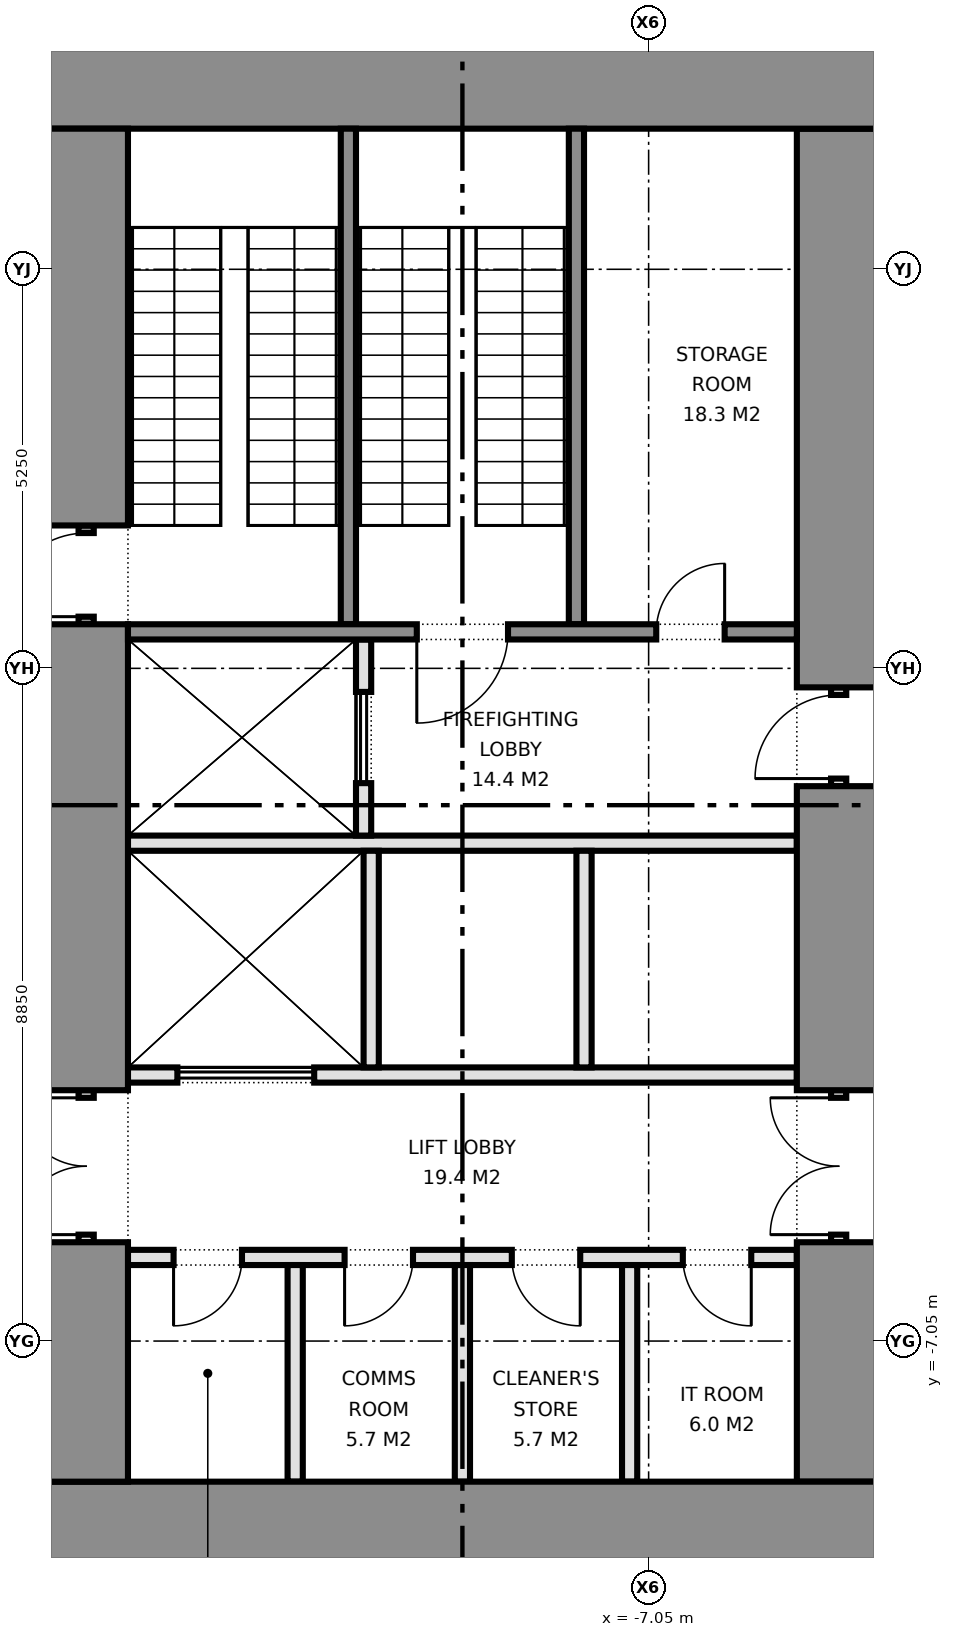
"""IFC4 building model, lengths in metres.
Left out: names, types, materials, properties, quantities, classifications, styles, units other than length and angle.
Written with IfcOpenShell. Run it as: python <this file> out.ifc"""

import sys

from ifc_helpers import new_model, si_unit, direction, frame, frame_2d, origin, place, context, subcontext, project, spatial, rectangle, extrude, element, fill, save


model = new_model("IFC4")
c1 = context("Model", 3, precision=1e-05, world=origin(), true_north=direction((0.0, 1.0)))
c2 = subcontext(c1, "Body", "Model", "MODEL_VIEW")
j1 = project(units=[si_unit("LENGTHUNIT", "METRE"), si_unit("PLANEANGLEUNIT", "RADIAN")], contexts=[c1])
p1 = place(None, origin())
s1 = spatial("IfcSite", under=j1, at=p1, CompositionType="ELEMENT")
p2 = place(p1, origin())
s2 = spatial("IfcBuilding", under=s1, at=p2, CompositionType="ELEMENT")
p3 = place(p2, frame((0.0, 0.0, -10.0)))
s3 = spatial("IfcBuildingStorey", under=s2, at=p3, CompositionType="ELEMENT", Elevation=-10.0)
for number, where, z_axis, x_axis in (
    (1, (-15.0, -9.45, 0.0), (0.0, 0.0, 1.0), (1.0, 0.0, 0.0)),
    (2, (-15.0, 9.45, 0.0), (0.0, 0.0, 1.0), (1.0, 0.0, 0.0)),
):
    element("IfcWall", number, at=place(p3, frame(where, z_axis=z_axis, x_axis=x_axis)), inside=s3, PredefinedType="SHEAR", context=c2, shape_type="SweptSolid", body=[
        extrude(rectangle(XDim=11.0, YDim=1.1, at=frame_2d((5.5, 0.0))), origin(), (0.0, 0.0, 1.0), 4.7),
    ])
p4 = place(p3, frame((-14.45, -8.9, 0.0), z_axis=(0.0, 0.0, 1.0), x_axis=(0.0, 1.0, 0.0)))
e3 = element("IfcWall", 3, at=p4, inside=s3, PredefinedType="SHEAR", context=c2, shape_type="SweptSolid", body=[
    extrude(rectangle(XDim=3.15, YDim=1.1, at=frame_2d((1.575, 0.0))), origin(), (0.0, 0.0, 1.0), 4.7),
])
p5 = place(p3, frame((-14.45, -5.75, 0.0), z_axis=(0.0, 0.0, 1.0), x_axis=(0.0, 1.0, 0.0)))
e4 = element("IfcWall", 4, at=p5, inside=s3, PredefinedType="PARTITIONING", context=c2, shape_type="SweptSolid", body=[
    extrude(rectangle(XDim=2.0, YDim=0.2, at=frame_2d((1.0, 0.0))), origin(), (0.0, 0.0, 1.0), 2.4),
])
p6 = place(p5, frame((0.1, 0.0, 0.0)))
e5 = element("IfcOpeningElement", 5, at=p6, cuts=e4, PredefinedType="OPENING", context=c2, shape_type="SweptSolid", body=[
    extrude(rectangle(XDim=1.8, YDim=2.1, at=frame_2d((0.9, 1.05))), frame((0.0, 0.11, 0.0), z_axis=(0.0, -1.0, 0.0), x_axis=(1.0, 0.0, 0.0)), (0.0, 0.0, 1.0), 0.22),
])
p7 = place(p3, frame((-14.45, -3.75, 0.0), z_axis=(0.0, 0.0, 1.0), x_axis=(0.0, 1.0, 0.0)))
e6 = element("IfcWall", 6, at=p7, inside=s3, PredefinedType="SHEAR", context=c2, shape_type="SweptSolid", body=[
    extrude(rectangle(XDim=6.13, YDim=1.1, at=frame_2d((3.065, 0.0))), origin(), (0.0, 0.0, 1.0), 4.7),
])
p8 = place(p3, frame((-14.45, 2.38, 0.0), z_axis=(0.0, 0.0, 1.0), x_axis=(0.0, 1.0, 0.0)))
e7 = element("IfcWall", 7, at=p8, inside=s3, PredefinedType="SHEAR", context=c2, shape_type="SweptSolid", body=[
    extrude(rectangle(XDim=1.3, YDim=0.2, at=frame_2d((0.65, 0.0))), origin(), (0.0, 0.0, 1.0), 2.4),
])
p9 = place(p8, frame((0.1, 0.0, 0.0)))
e8 = element("IfcOpeningElement", 8, at=p9, cuts=e7, PredefinedType="OPENING", context=c2, shape_type="SweptSolid", body=[
    extrude(rectangle(XDim=1.1, YDim=2.1, at=frame_2d((0.55, 1.05))), frame((0.0, 0.11, 0.0), z_axis=(0.0, -1.0, 0.0), x_axis=(1.0, 0.0, 0.0)), (0.0, 0.0, 1.0), 0.22),
])
p10 = place(p3, frame((-14.45, 3.68, 0.0), z_axis=(0.0, 0.0, 1.0), x_axis=(0.0, 1.0, 0.0)))
e9 = element("IfcWall", 9, at=p10, inside=s3, PredefinedType="SHEAR", context=c2, shape_type="SweptSolid", body=[
    extrude(rectangle(XDim=5.22, YDim=1.1, at=frame_2d((2.61, 0.0))), origin(), (0.0, 0.0, 1.0), 4.7),
])
p11 = place(p3, frame((-4.55, -8.9, 0.0), z_axis=(0.0, 0.0, 1.0), x_axis=(0.0, 1.0, 0.0)))
e10 = element("IfcWall", 10, at=p11, inside=s3, PredefinedType="SHEAR", context=c2, shape_type="SweptSolid", body=[
    extrude(rectangle(XDim=3.15, YDim=1.1, at=frame_2d((1.575, 0.0))), origin(), (0.0, 0.0, 1.0), 4.7),
])
p12 = place(p3, frame((-4.55, -5.75, 0.0), z_axis=(0.0, 0.0, 1.0), x_axis=(0.0, 1.0, 0.0)))
e11 = element("IfcWall", 11, at=p12, inside=s3, PredefinedType="PARTITIONING", context=c2, shape_type="SweptSolid", body=[
    extrude(rectangle(XDim=2.0, YDim=0.2, at=frame_2d((1.0, 0.0))), origin(), (0.0, 0.0, 1.0), 2.4),
])
p13 = place(p12, frame((0.1, 0.0, 0.0)))
e12 = element("IfcOpeningElement", 12, at=p13, cuts=e11, PredefinedType="OPENING", context=c2, shape_type="SweptSolid", body=[
    extrude(rectangle(XDim=1.8, YDim=2.1, at=frame_2d((0.9, 1.05))), frame((0.0, 0.11, 0.0), z_axis=(0.0, -1.0, 0.0), x_axis=(1.0, 0.0, 0.0)), (0.0, 0.0, 1.0), 0.22),
])
p14 = place(p3, frame((-4.55, -3.75, 0.0), z_axis=(0.0, 0.0, 1.0), x_axis=(0.0, 1.0, 0.0)))
e13 = element("IfcWall", 13, at=p14, inside=s3, PredefinedType="SHEAR", context=c2, shape_type="SweptSolid", body=[
    extrude(rectangle(XDim=4.0, YDim=1.1, at=frame_2d((2.0, 0.0))), origin(), (0.0, 0.0, 1.0), 4.7),
])
p15 = place(p3, frame((-4.55, 0.25, 0.0), z_axis=(0.0, 0.0, 1.0), x_axis=(0.0, 1.0, 0.0)))
e14 = element("IfcWall", 14, at=p15, inside=s3, PredefinedType="PARTITIONING", context=c2, shape_type="SweptSolid", body=[
    extrude(rectangle(XDim=1.3, YDim=0.2, at=frame_2d((0.65, 0.0))), origin(), (0.0, 0.0, 1.0), 2.4),
])
p16 = place(p15, frame((0.1, 0.0, 0.0)))
e15 = element("IfcOpeningElement", 15, at=p16, cuts=e14, PredefinedType="OPENING", context=c2, shape_type="SweptSolid", body=[
    extrude(rectangle(XDim=1.1, YDim=2.1, at=frame_2d((0.55, 1.05))), frame((0.0, 0.11, 0.0), z_axis=(0.0, -1.0, 0.0), x_axis=(1.0, 0.0, 0.0)), (0.0, 0.0, 1.0), 0.22),
])
p17 = place(p3, frame((-4.55, 1.55, 0.0), z_axis=(0.0, 0.0, 1.0), x_axis=(0.0, 1.0, 0.0)))
e16 = element("IfcWall", 16, at=p17, inside=s3, PredefinedType="SHEAR", context=c2, shape_type="SweptSolid", body=[
    extrude(rectangle(XDim=7.35, YDim=1.1, at=frame_2d((3.675, 0.0))), origin(), (0.0, 0.0, 1.0), 4.7),
])
p18 = place(p3, frame((-13.9, -5.95, 0.0), z_axis=(0.0, 0.0, 1.0), x_axis=(1.0, 0.0, 0.0)))
e17 = element("IfcWall", 17, at=p18, inside=s3, PredefinedType="PARTITIONING", context=c2, shape_type="SweptSolid", body=[
    extrude(rectangle(XDim=8.8, YDim=0.2, at=frame_2d((4.4, 0.0))), origin(), (0.0, 0.0, 1.0), 4.7),
])
p19 = place(p18, frame((0.6, 0.0, 0.0)))
e18 = element("IfcOpeningElement", 18, at=p19, cuts=e17, PredefinedType="OPENING", context=c2, shape_type="SweptSolid", body=[
    extrude(rectangle(XDim=0.9, YDim=2.1, at=frame_2d((0.45, 1.05))), frame((0.0, 0.11, 0.0), z_axis=(0.0, -1.0, 0.0), x_axis=(1.0, 0.0, 0.0)), (0.0, 0.0, 1.0), 0.22),
])
p20 = place(p18, frame((2.85, 0.0, 0.0)))
e19 = element("IfcOpeningElement", 19, at=p20, cuts=e17, PredefinedType="OPENING", context=c2, shape_type="SweptSolid", body=[
    extrude(rectangle(XDim=0.9, YDim=2.1, at=frame_2d((0.45, 1.05))), frame((0.0, 0.11, 0.0), z_axis=(0.0, -1.0, 0.0), x_axis=(1.0, 0.0, 0.0)), (0.0, 0.0, 1.0), 0.22),
])
p21 = place(p18, frame((5.05, 0.0, 0.0)))
e20 = element("IfcOpeningElement", 20, at=p21, cuts=e17, PredefinedType="OPENING", context=c2, shape_type="SweptSolid", body=[
    extrude(rectangle(XDim=0.9, YDim=2.1, at=frame_2d((0.45, 1.05))), frame((0.0, 0.11, 0.0), z_axis=(0.0, -1.0, 0.0), x_axis=(1.0, 0.0, 0.0)), (0.0, 0.0, 1.0), 0.22),
])
p22 = place(p18, frame((7.3, 0.0, 0.0)))
e21 = element("IfcOpeningElement", 21, at=p22, cuts=e17, PredefinedType="OPENING", context=c2, shape_type="SweptSolid", body=[
    extrude(rectangle(XDim=0.9, YDim=2.1, at=frame_2d((0.45, 1.05))), frame((0.0, 0.11, 0.0), z_axis=(0.0, -1.0, 0.0), x_axis=(1.0, 0.0, 0.0)), (0.0, 0.0, 1.0), 0.22),
])
p23 = place(p3, frame((-13.9, -3.55, 0.0), z_axis=(0.0, 0.0, 1.0), x_axis=(1.0, 0.0, 0.0)))
e22 = element("IfcWall", 22, at=p23, inside=s3, PredefinedType="PARTITIONING", context=c2, shape_type="SweptSolid", body=[
    extrude(rectangle(XDim=8.8, YDim=0.2, at=frame_2d((4.4, 0.0))), origin(), (0.0, 0.0, 1.0), 4.7),
])
p24 = place(p23, frame((0.65, 0.0, 0.0)))
e23 = element("IfcOpeningElement", 23, at=p24, cuts=e22, PredefinedType="OPENING", context=c2, shape_type="SweptSolid", body=[
    extrude(rectangle(XDim=1.8, YDim=2.1, at=frame_2d((0.9, 1.05))), frame((0.0, 0.11, 0.0), z_axis=(0.0, -1.0, 0.0), x_axis=(1.0, 0.0, 0.0)), (0.0, 0.0, 1.0), 0.22),
])
p25 = place(p3, frame((-13.9, -0.5, 0.0), z_axis=(0.0, 0.0, 1.0), x_axis=(1.0, 0.0, 0.0)))
e24 = element("IfcWall", 24, at=p25, inside=s3, PredefinedType="PARTITIONING", context=c2, shape_type="SweptSolid", body=[
    extrude(rectangle(XDim=8.8, YDim=0.2, at=frame_2d((4.4, 0.0))), origin(), (0.0, 0.0, 1.0), 4.7),
])
p26 = place(p3, frame((-10.8, -0.4, 0.0), z_axis=(0.0, 0.0, 1.0), x_axis=(0.0, 1.0, 0.0)))
e25 = element("IfcWall", 25, at=p26, inside=s3, PredefinedType="PARTITIONING", context=c2, shape_type="SweptSolid", body=[
    extrude(rectangle(XDim=2.58, YDim=0.2, at=frame_2d((1.29, 0.0))), origin(), (0.0, 0.0, 1.0), 4.7),
])
p27 = place(p26, frame((0.69, 0.0, 0.0)))
e26 = element("IfcOpeningElement", 26, at=p27, cuts=e25, PredefinedType="OPENING", context=c2, shape_type="SweptSolid", body=[
    extrude(rectangle(XDim=1.2, YDim=2.1, at=frame_2d((0.6, 1.05))), frame((0.0, 0.11, 0.0), z_axis=(0.0, -1.0, 0.0), x_axis=(1.0, 0.0, 0.0)), (0.0, 0.0, 1.0), 0.22),
])
p28 = place(p3, frame((-13.9, 2.28, 0.0), z_axis=(0.0, 0.0, 1.0), x_axis=(1.0, 0.0, 0.0)))
e27 = element("IfcWall", 27, at=p28, inside=s3, PredefinedType="SHEAR", context=c2, shape_type="SweptSolid", body=[
    extrude(rectangle(XDim=8.8, YDim=0.2, at=frame_2d((4.4, 0.0))), origin(), (0.0, 0.0, 1.0), 4.7),
])
p29 = place(p28, frame((3.8, 0.0, 0.0)))
e28 = element("IfcOpeningElement", 28, at=p29, cuts=e27, PredefinedType="OPENING", context=c2, shape_type="SweptSolid", body=[
    extrude(rectangle(XDim=1.2, YDim=2.1, at=frame_2d((0.6, 1.05))), frame((0.0, 0.11, 0.0), z_axis=(0.0, -1.0, 0.0), x_axis=(1.0, 0.0, 0.0)), (0.0, 0.0, 1.0), 0.22),
])
p30 = place(p28, frame((6.95, 0.0, 0.0)))
e29 = element("IfcOpeningElement", 29, at=p30, cuts=e27, PredefinedType="OPENING", context=c2, shape_type="SweptSolid", body=[
    extrude(rectangle(XDim=0.9, YDim=2.1, at=frame_2d((0.45, 1.05))), frame((0.0, 0.11, 0.0), z_axis=(0.0, -1.0, 0.0), x_axis=(1.0, 0.0, 0.0)), (0.0, 0.0, 1.0), 0.22),
])
for number, where, z_axis, x_axis in (
    (30, (-11.0, 2.38, 0.0), (0.0, 0.0, 1.0), (0.0, 1.0, 0.0)),
    (31, (-8.0, 2.38, 0.0), (0.0, 0.0, 1.0), (0.0, 1.0, 0.0)),
):
    element("IfcWall", number, at=place(p3, frame(where, z_axis=z_axis, x_axis=x_axis)), inside=s3, PredefinedType="SHEAR", context=c2, shape_type="SweptSolid", body=[
        extrude(rectangle(XDim=6.52, YDim=0.2, at=frame_2d((3.26, 0.0))), origin(), (0.0, 0.0, 1.0), 4.7),
    ])
for number, where, z_axis, x_axis in (
    (32, (-11.7, -8.9, 0.0), (0.0, 0.0, 1.0), (0.0, 1.0, 0.0)),
    (33, (-9.5, -8.9, 0.0), (0.0, 0.0, 1.0), (0.0, 1.0, 0.0)),
    (34, (-7.3, -8.9, 0.0), (0.0, 0.0, 1.0), (0.0, 1.0, 0.0)),
    (35, (-10.7, -3.45, 0.0), (0.0, 0.0, 1.0), (0.0, 1.0, 0.0)),
    (36, (-7.9, -3.45, 0.0), (0.0, 0.0, 1.0), (0.0, 1.0, 0.0)),
):
    element("IfcWall", number, at=place(p3, frame(where, z_axis=z_axis, x_axis=x_axis)), inside=s3, PredefinedType="PARTITIONING", context=c2, shape_type="SweptSolid", body=[
        extrude(rectangle(XDim=2.85, YDim=0.2, at=frame_2d((1.425, 0.0))), origin(), (0.0, 0.0, 1.0), 4.7),
    ])
p31 = place(p6, origin())
e37 = element("IfcDoor", 37, at=p31, inside=s3, OperationType="DOUBLE_DOOR_SINGLE_SWING", PredefinedType="DOOR", context=c2, shape_type="SweptSolid", body=[
    extrude(rectangle(XDim=1.8, YDim=2.1, at=frame_2d((0.9, 1.05))), frame((0.0, 0.025, 0.0), z_axis=(0.0, -1.0, 0.0), x_axis=(1.0, 0.0, 0.0)), (0.0, 0.0, 1.0), 0.05),
])
fill(e5, e37)
p32 = place(p9, origin())
e38 = element("IfcDoor", 38, at=p32, inside=s3, OperationType="SINGLE_SWING_LEFT", PredefinedType="DOOR", context=c2, shape_type="SweptSolid", body=[
    extrude(rectangle(XDim=1.1, YDim=2.1, at=frame_2d((0.55, 1.05))), frame((0.0, 0.025, 0.0), z_axis=(0.0, -1.0, 0.0), x_axis=(1.0, 0.0, 0.0)), (0.0, 0.0, 1.0), 0.05),
])
fill(e8, e38)
p33 = place(p13, origin())
e39 = element("IfcDoor", 39, at=p33, inside=s3, OperationType="DOUBLE_DOOR_SINGLE_SWING", PredefinedType="DOOR", context=c2, shape_type="SweptSolid", body=[
    extrude(rectangle(XDim=1.8, YDim=2.1, at=frame_2d((0.9, 1.05))), frame((0.0, 0.025, 0.0), z_axis=(0.0, -1.0, 0.0), x_axis=(1.0, 0.0, 0.0)), (0.0, 0.0, 1.0), 0.05),
])
fill(e12, e39)
p34 = place(p16, origin())
e40 = element("IfcDoor", 40, at=p34, inside=s3, OperationType="SINGLE_SWING_LEFT", PredefinedType="DOOR", context=c2, shape_type="SweptSolid", body=[
    extrude(rectangle(XDim=1.1, YDim=2.1, at=frame_2d((0.55, 1.05))), frame((0.0, 0.025, 0.0), z_axis=(0.0, -1.0, 0.0), x_axis=(1.0, 0.0, 0.0)), (0.0, 0.0, 1.0), 0.05),
])
fill(e15, e40)
p35 = place(p24, origin())
e41 = element("IfcDoor", 41, at=p35, inside=s3, OperationType="DOUBLE_DOOR_SLIDING", PredefinedType="DOOR", context=c2, shape_type="SweptSolid", body=[
    extrude(rectangle(XDim=1.8, YDim=2.1, at=frame_2d((0.9, 1.05))), frame((0.0, 0.025, 0.0), z_axis=(0.0, -1.0, 0.0), x_axis=(1.0, 0.0, 0.0)), (0.0, 0.0, 1.0), 0.05),
])
fill(e23, e41)
p36 = place(p27, origin())
e42 = element("IfcDoor", 42, at=p36, inside=s3, OperationType="DOUBLE_DOOR_SLIDING", PredefinedType="DOOR", context=c2, shape_type="SweptSolid", body=[
    extrude(rectangle(XDim=1.2, YDim=2.1, at=frame_2d((0.6, 1.05))), frame((0.0, 0.025, 0.0), z_axis=(0.0, -1.0, 0.0), x_axis=(1.0, 0.0, 0.0)), (0.0, 0.0, 1.0), 0.05),
])
fill(e26, e42)
p37 = place(p19, frame((0.9, 0.0, 0.0), z_axis=(0.0, 0.0, 1.0), x_axis=(-1.0, 0.0, 0.0)))
e43 = element("IfcDoor", 43, at=p37, inside=s3, OperationType="SINGLE_SWING_RIGHT", PredefinedType="DOOR", context=c2, shape_type="SweptSolid", body=[
    extrude(rectangle(XDim=0.9, YDim=2.1, at=frame_2d((0.45, 1.05))), frame((0.0, 0.025, 0.0), z_axis=(0.0, -1.0, 0.0), x_axis=(1.0, 0.0, 0.0)), (0.0, 0.0, 1.0), 0.05),
])
fill(e18, e43)
p38 = place(p20, frame((0.9, 0.0, 0.0), z_axis=(0.0, 0.0, 1.0), x_axis=(-1.0, 0.0, 0.0)))
e44 = element("IfcDoor", 44, at=p38, inside=s3, OperationType="SINGLE_SWING_RIGHT", PredefinedType="DOOR", context=c2, shape_type="SweptSolid", body=[
    extrude(rectangle(XDim=0.9, YDim=2.1, at=frame_2d((0.45, 1.05))), frame((0.0, 0.025, 0.0), z_axis=(0.0, -1.0, 0.0), x_axis=(1.0, 0.0, 0.0)), (0.0, 0.0, 1.0), 0.05),
])
fill(e19, e44)
p39 = place(p21, frame((0.9, 0.0, 0.0), z_axis=(0.0, 0.0, 1.0), x_axis=(-1.0, 0.0, 0.0)))
e45 = element("IfcDoor", 45, at=p39, inside=s3, OperationType="SINGLE_SWING_LEFT", PredefinedType="DOOR", context=c2, shape_type="SweptSolid", body=[
    extrude(rectangle(XDim=0.9, YDim=2.1, at=frame_2d((0.45, 1.05))), frame((0.0, 0.025, 0.0), z_axis=(0.0, -1.0, 0.0), x_axis=(1.0, 0.0, 0.0)), (0.0, 0.0, 1.0), 0.05),
])
fill(e20, e45)
p40 = place(p22, frame((0.9, 0.0, 0.0), z_axis=(0.0, 0.0, 1.0), x_axis=(-1.0, 0.0, 0.0)))
e46 = element("IfcDoor", 46, at=p40, inside=s3, OperationType="SINGLE_SWING_LEFT", PredefinedType="DOOR", context=c2, shape_type="SweptSolid", body=[
    extrude(rectangle(XDim=0.9, YDim=2.1, at=frame_2d((0.45, 1.05))), frame((0.0, 0.025, 0.0), z_axis=(0.0, -1.0, 0.0), x_axis=(1.0, 0.0, 0.0)), (0.0, 0.0, 1.0), 0.05),
])
fill(e21, e46)
p41 = place(p29, frame((1.2, 0.0, 0.0), z_axis=(0.0, 0.0, 1.0), x_axis=(-1.0, 0.0, 0.0)))
e47 = element("IfcDoor", 47, at=p41, inside=s3, OperationType="SINGLE_SWING_RIGHT", PredefinedType="DOOR", context=c2, shape_type="SweptSolid", body=[
    extrude(rectangle(XDim=1.2, YDim=2.1, at=frame_2d((0.6, 1.05))), frame((0.0, 0.025, 0.0), z_axis=(0.0, -1.0, 0.0), x_axis=(1.0, 0.0, 0.0)), (0.0, 0.0, 1.0), 0.05),
])
fill(e28, e47)
p42 = place(p30, origin())
e48 = element("IfcDoor", 48, at=p42, inside=s3, OperationType="SINGLE_SWING_RIGHT", PredefinedType="DOOR", context=c2, shape_type="SweptSolid", body=[
    extrude(rectangle(XDim=0.9, YDim=2.1, at=frame_2d((0.45, 1.05))), frame((0.0, 0.025, 0.0), z_axis=(0.0, -1.0, 0.0), x_axis=(1.0, 0.0, 0.0)), (0.0, 0.0, 1.0), 0.05),
])
fill(e29, e48)
save(model, sys.argv[1])
